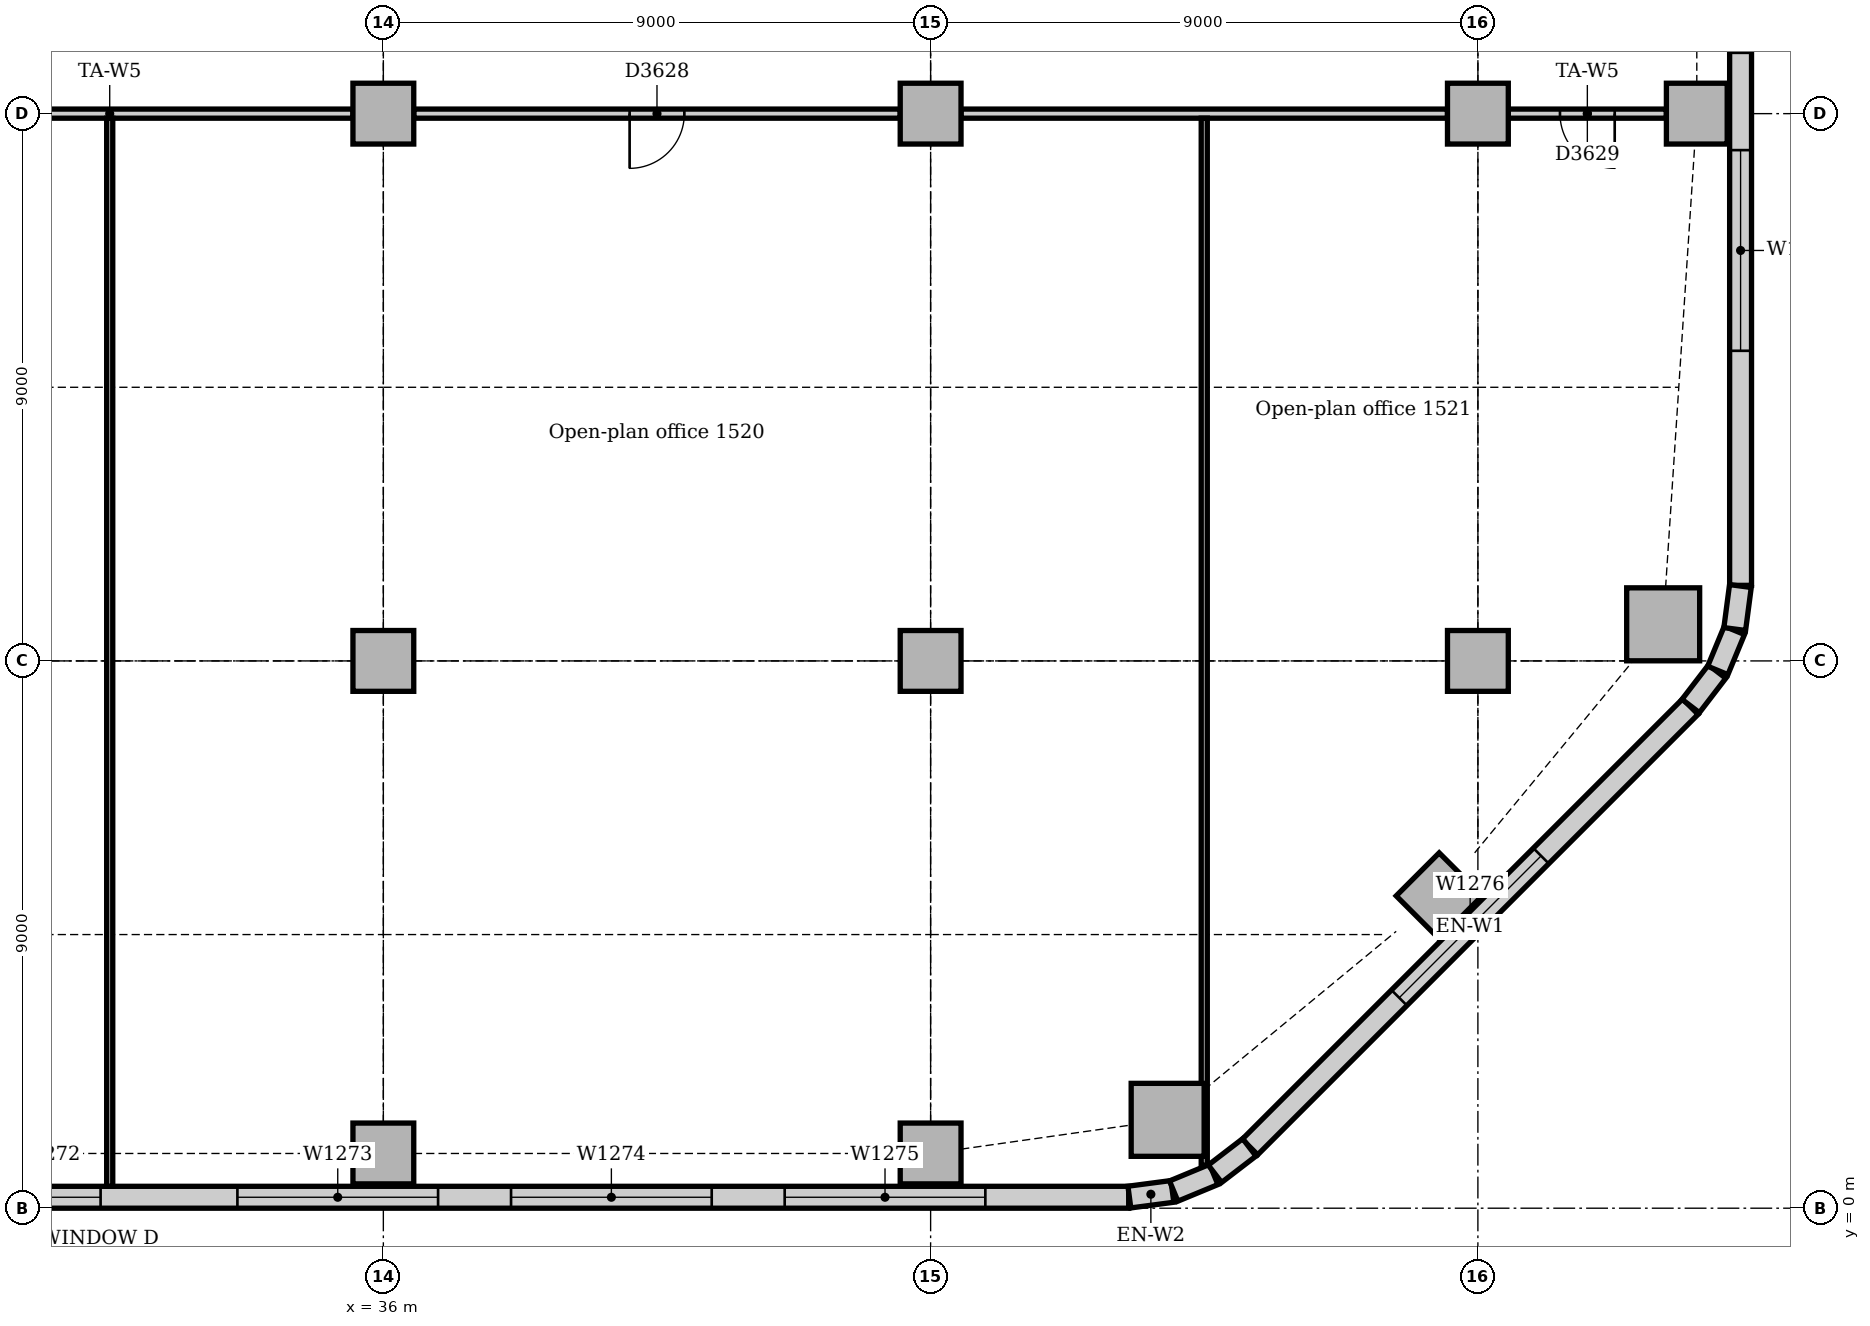
"""IFC4 building model, lengths in metres.
Left out: names, types, materials, properties, quantities, classifications, styles, units other than length and angle.
Written with IfcOpenShell. Run it as: python <this file> out.ifc"""

import sys

from ifc_helpers import new_model, si_unit, direction, frame, frame_2d, origin, origin_2d, place, context, subcontext, project, spatial, rectangle, extrude, element, fill, save


model = new_model("IFC4")
c1 = context("Model", 3, precision=1e-05, world=origin(), true_north=direction((0.0, 1.0)))
c2 = subcontext(c1, "Body", "Model", "MODEL_VIEW")
j1 = project(units=[si_unit("LENGTHUNIT", "METRE"), si_unit("PLANEANGLEUNIT", "RADIAN")], contexts=[c1])
p1 = place(None, origin())
s1 = spatial("IfcSite", under=j1, at=p1, CompositionType="ELEMENT")
p2 = place(p1, origin())
s2 = spatial("IfcBuilding", under=s1, at=p2, CompositionType="ELEMENT")
p3 = place(p2, frame((0.0, 0.0, 67.0)))
s3 = spatial("IfcBuildingStorey", under=s2, at=p3, CompositionType="ELEMENT", Elevation=67.0)
for number, where, z_axis, x_axis in (
    (1, (48.898, 1.453, 0.0), (0.0, 0.0, 1.0), (1.0, 0.0, 0.0)),
    (2, (57.047, 9.602, 0.0), (0.0, 0.0, 1.0), (1.0, 0.0, 0.0)),
):
    element("IfcColumn", number, at=place(p3, frame(where, z_axis=z_axis, x_axis=x_axis)), inside=s3, PredefinedType="COLUMN", context=c2, shape_type="SweptSolid", body=[
        extrude(rectangle(XDim=1.2, YDim=1.2, at=origin_2d()), origin(), (0.0, 0.0, 1.0), 3.85),
    ])
for number, where, z_axis, x_axis in (
    (3, (36.0, 0.9, 0.0), (0.0, 0.0, 1.0), (1.0, 0.0, 0.0)),
    (4, (45.0, 0.9, 0.0), (0.0, 0.0, 1.0), (1.0, 0.0, 0.0)),
    (5, (53.364, 5.136, 0.0), (0.0, 0.0, 1.0), (0.707, 0.707, 0.0)),
    (6, (57.6, 18.0, 0.0), (0.0, 0.0, 1.0), (1.0, 0.0, 0.0)),
    (7, (36.0, 9.0, 0.0), (0.0, 0.0, 1.0), (1.0, 0.0, 0.0)),
    (8, (36.0, 18.0, 0.0), (0.0, 0.0, 1.0), (1.0, 0.0, 0.0)),
    (9, (45.0, 9.0, 0.0), (0.0, 0.0, 1.0), (1.0, 0.0, 0.0)),
    (10, (45.0, 18.0, 0.0), (0.0, 0.0, 1.0), (1.0, 0.0, 0.0)),
    (11, (54.0, 9.0, 0.0), (0.0, 0.0, 1.0), (1.0, 0.0, 0.0)),
    (12, (54.0, 18.0, 0.0), (0.0, 0.0, 1.0), (1.0, 0.0, 0.0)),
):
    element("IfcColumn", number, at=place(p3, frame(where, z_axis=z_axis, x_axis=x_axis)), inside=s3, PredefinedType="COLUMN", context=c2, shape_type="SweptSolid", body=[
        extrude(rectangle(XDim=1.0, YDim=1.0, at=origin_2d()), origin(), (0.0, 0.0, 1.0), 3.85),
    ])
p4 = place(p3, frame((4.243, 0.18, 0.0), z_axis=(0.0, 0.0, 1.0), x_axis=(1.0, 0.0, 0.0)))
e13 = element("IfcWall", 13, at=p4, inside=s3, PredefinedType="STANDARD", context=c2, shape_type="SweptSolid", body=[
    extrude(rectangle(XDim=44.015, YDim=0.36, at=frame_2d((22.007, 0.0))), origin(), (0.0, 0.0, 1.0), 3.85),
])
p5 = place(p4, frame((2.357, 0.0, 0.9)))
e14 = element("IfcOpeningElement", 14, at=p5, cuts=e13, PredefinedType="OPENING", context=c2, shape_type="SweptSolid", body=[
    extrude(rectangle(XDim=3.3, YDim=1.6, at=frame_2d((1.65, 0.8))), frame((0.0, 0.19, 0.0), z_axis=(0.0, -1.0, 0.0), x_axis=(1.0, 0.0, 0.0)), (0.0, 0.0, 1.0), 0.38),
])
p6 = place(p4, frame((6.857, 0.0, 0.9)))
e15 = element("IfcOpeningElement", 15, at=p6, cuts=e13, PredefinedType="OPENING", context=c2, shape_type="SweptSolid", body=[
    extrude(rectangle(XDim=3.3, YDim=1.6, at=frame_2d((1.65, 0.8))), frame((0.0, 0.19, 0.0), z_axis=(0.0, -1.0, 0.0), x_axis=(1.0, 0.0, 0.0)), (0.0, 0.0, 1.0), 0.38),
])
p7 = place(p4, frame((11.357, 0.0, 0.9)))
e16 = element("IfcOpeningElement", 16, at=p7, cuts=e13, PredefinedType="OPENING", context=c2, shape_type="SweptSolid", body=[
    extrude(rectangle(XDim=3.3, YDim=1.6, at=frame_2d((1.65, 0.8))), frame((0.0, 0.19, 0.0), z_axis=(0.0, -1.0, 0.0), x_axis=(1.0, 0.0, 0.0)), (0.0, 0.0, 1.0), 0.38),
])
p8 = place(p4, frame((15.857, 0.0, 0.9)))
e17 = element("IfcOpeningElement", 17, at=p8, cuts=e13, PredefinedType="OPENING", context=c2, shape_type="SweptSolid", body=[
    extrude(rectangle(XDim=3.3, YDim=1.6, at=frame_2d((1.65, 0.8))), frame((0.0, 0.19, 0.0), z_axis=(0.0, -1.0, 0.0), x_axis=(1.0, 0.0, 0.0)), (0.0, 0.0, 1.0), 0.38),
])
p9 = place(p4, frame((20.357, 0.0, 0.9)))
e18 = element("IfcOpeningElement", 18, at=p9, cuts=e13, PredefinedType="OPENING", context=c2, shape_type="SweptSolid", body=[
    extrude(rectangle(XDim=3.3, YDim=1.6, at=frame_2d((1.65, 0.8))), frame((0.0, 0.19, 0.0), z_axis=(0.0, -1.0, 0.0), x_axis=(1.0, 0.0, 0.0)), (0.0, 0.0, 1.0), 0.38),
])
p10 = place(p4, frame((25.307, 0.0, 0.9)))
e19 = element("IfcOpeningElement", 19, at=p10, cuts=e13, PredefinedType="OPENING", context=c2, shape_type="SweptSolid", body=[
    extrude(rectangle(XDim=1.8, YDim=1.6, at=frame_2d((0.9, 0.8))), frame((0.0, 0.19, 0.0), z_axis=(0.0, -1.0, 0.0), x_axis=(1.0, 0.0, 0.0)), (0.0, 0.0, 1.0), 0.38),
])
p11 = place(p4, frame((29.357, 0.0, 0.9)))
e20 = element("IfcOpeningElement", 20, at=p11, cuts=e13, PredefinedType="OPENING", context=c2, shape_type="SweptSolid", body=[
    extrude(rectangle(XDim=3.3, YDim=1.6, at=frame_2d((1.65, 0.8))), frame((0.0, 0.19, 0.0), z_axis=(0.0, -1.0, 0.0), x_axis=(1.0, 0.0, 0.0)), (0.0, 0.0, 1.0), 0.38),
])
p12 = place(p4, frame((33.857, 0.0, 0.9)))
e21 = element("IfcOpeningElement", 21, at=p12, cuts=e13, PredefinedType="OPENING", context=c2, shape_type="SweptSolid", body=[
    extrude(rectangle(XDim=3.3, YDim=1.6, at=frame_2d((1.65, 0.8))), frame((0.0, 0.19, 0.0), z_axis=(0.0, -1.0, 0.0), x_axis=(1.0, 0.0, 0.0)), (0.0, 0.0, 1.0), 0.38),
])
p13 = place(p4, frame((38.357, 0.0, 0.9)))
e22 = element("IfcOpeningElement", 22, at=p13, cuts=e13, PredefinedType="OPENING", context=c2, shape_type="SweptSolid", body=[
    extrude(rectangle(XDim=3.3, YDim=1.6, at=frame_2d((1.65, 0.8))), frame((0.0, 0.19, 0.0), z_axis=(0.0, -1.0, 0.0), x_axis=(1.0, 0.0, 0.0)), (0.0, 0.0, 1.0), 0.38),
])
p14 = place(p3, frame((50.251, 1.006, 0.0), z_axis=(0.0, 0.0, 1.0), x_axis=(0.707106781187, 0.707106781187, 0.0)))
e23 = element("IfcWall", 23, at=p14, inside=s3, PredefinedType="STANDARD", context=c2, shape_type="SweptSolid", body=[
    extrude(rectangle(XDim=10.243, YDim=0.36, at=frame_2d((5.121, 0.0))), origin(), (0.0, 0.0, 1.0), 3.85),
])
p15 = place(p14, frame((3.471, 0.0, 0.9)))
e24 = element("IfcOpeningElement", 24, at=p15, cuts=e23, PredefinedType="OPENING", context=c2, shape_type="SweptSolid", body=[
    extrude(rectangle(XDim=3.3, YDim=1.6, at=frame_2d((1.65, 0.8))), frame((0.0, 0.19, 0.0), z_axis=(0.0, -1.0, 0.0), x_axis=(1.0, 0.0, 0.0)), (0.0, 0.0, 1.0), 0.38),
])
p16 = place(p3, frame((58.32, 10.243, 0.0), z_axis=(0.0, 0.0, 1.0), x_axis=(0.0, 1.0, 0.0)))
e25 = element("IfcWall", 25, at=p16, inside=s3, PredefinedType="STANDARD", context=c2, shape_type="SweptSolid", body=[
    extrude(rectangle(XDim=24.515, YDim=0.36, at=frame_2d((12.257, 0.0))), origin(), (0.0, 0.0, 1.0), 3.85),
])
p17 = place(p16, frame((3.857, 0.0, 0.9)))
e26 = element("IfcOpeningElement", 26, at=p17, cuts=e25, PredefinedType="OPENING", context=c2, shape_type="SweptSolid", body=[
    extrude(rectangle(XDim=3.3, YDim=1.6, at=frame_2d((1.65, 0.8))), frame((0.0, 0.19, 0.0), z_axis=(0.0, -1.0, 0.0), x_axis=(1.0, 0.0, 0.0)), (0.0, 0.0, 1.0), 0.38),
])
p18 = place(p16, frame((8.757, 0.0, 0.9)))
e27 = element("IfcOpeningElement", 27, at=p18, cuts=e25, PredefinedType="OPENING", context=c2, shape_type="SweptSolid", body=[
    extrude(rectangle(XDim=1.8, YDim=1.6, at=frame_2d((0.9, 0.8))), frame((0.0, 0.19, 0.0), z_axis=(0.0, -1.0, 0.0), x_axis=(1.0, 0.0, 0.0)), (0.0, 0.0, 1.0), 0.38),
])
p19 = place(p16, frame((12.857, 0.0, 0.9)))
e28 = element("IfcOpeningElement", 28, at=p19, cuts=e25, PredefinedType="OPENING", context=c2, shape_type="SweptSolid", body=[
    extrude(rectangle(XDim=3.3, YDim=1.6, at=frame_2d((1.65, 0.8))), frame((0.0, 0.19, 0.0), z_axis=(0.0, -1.0, 0.0), x_axis=(1.0, 0.0, 0.0)), (0.0, 0.0, 1.0), 0.38),
])
p20 = place(p16, frame((17.357, 0.0, 0.9)))
e29 = element("IfcOpeningElement", 29, at=p20, cuts=e25, PredefinedType="OPENING", context=c2, shape_type="SweptSolid", body=[
    extrude(rectangle(XDim=3.3, YDim=1.6, at=frame_2d((1.65, 0.8))), frame((0.0, 0.19, 0.0), z_axis=(0.0, -1.0, 0.0), x_axis=(1.0, 0.0, 0.0)), (0.0, 0.0, 1.0), 0.38),
])
for number, where, z_axis, x_axis in (
    (30, (48.269, 0.183, 0.0), (0.0, 0.0, 1.0), (0.991, 0.131, 0.0)),
    (31, (48.997, 0.282, 0.0), (0.0, 0.0, 1.0), (0.924, 0.383, 0.0)),
):
    element("IfcWall", number, at=place(p3, frame(where, z_axis=z_axis, x_axis=x_axis)), inside=s3, PredefinedType="STANDARD", context=c2, shape_type="SweptSolid", body=[
        extrude(rectangle(XDim=0.713, YDim=0.36, at=frame_2d((0.356, 0.0))), origin(), (0.0, 0.0, 1.0), 3.85),
    ])
for number, where, z_axis, x_axis in (
    (32, (49.675, 0.566, 0.0), (0.0, 0.0, 1.0), (0.793, 0.609, 0.0)),
    (33, (57.5, 8.259, 0.0), (0.0, 0.0, 1.0), (0.609, 0.793, 0.0)),
):
    element("IfcWall", number, at=place(p3, frame(where, z_axis=z_axis, x_axis=x_axis)), inside=s3, PredefinedType="STANDARD", context=c2, shape_type="SweptSolid", body=[
        extrude(rectangle(XDim=0.713, YDim=0.36, at=frame_2d((0.357, 0.0))), origin(), (0.0, 0.0, 1.0), 3.85),
    ])
for number, where, z_axis, x_axis in (
    (34, (57.945, 8.844, 0.0), (0.0, 0.0, 1.0), (0.383, 0.924, 0.0)),
    (35, (58.224, 9.524, 0.0), (0.0, 0.0, 1.0), (0.131, 0.991, 0.0)),
):
    element("IfcWall", number, at=place(p3, frame(where, z_axis=z_axis, x_axis=x_axis)), inside=s3, PredefinedType="STANDARD", context=c2, shape_type="SweptSolid", body=[
        extrude(rectangle(XDim=0.713, YDim=0.36, at=frame_2d((0.356, 0.0))), origin(), (0.0, 0.0, 1.0), 3.85),
    ])
p21 = place(p3, frame((54.5, 18.0, 0.0), z_axis=(0.0, 0.0, 1.0), x_axis=(1.0, 0.0, 0.0)))
e36 = element("IfcWall", 36, at=p21, inside=s3, PredefinedType="PARTITIONING", context=c2, shape_type="SweptSolid", body=[
    extrude(rectangle(XDim=2.6, YDim=0.15, at=frame_2d((1.3, 0.0))), origin(), (0.0, 0.0, 1.0), 3.602),
])
p22 = place(p21, frame((0.85, 0.0, 0.0)))
e37 = element("IfcOpeningElement", 37, at=p22, cuts=e36, PredefinedType="OPENING", context=c2, shape_type="SweptSolid", body=[
    extrude(rectangle(XDim=0.9, YDim=2.1, at=frame_2d((0.45, 1.05))), frame((0.0, 0.085, 0.0), z_axis=(0.0, -1.0, 0.0), x_axis=(1.0, 0.0, 0.0)), (0.0, 0.0, 1.0), 0.17),
])
p23 = place(p3, frame((45.5, 18.0, 0.0), z_axis=(0.0, 0.0, 1.0), x_axis=(1.0, 0.0, 0.0)))
e38 = element("IfcWall", 38, at=p23, inside=s3, PredefinedType="PARTITIONING", context=c2, shape_type="SweptSolid", body=[
    extrude(rectangle(XDim=8.0, YDim=0.15, at=frame_2d((4.0, 0.0))), origin(), (0.0, 0.0, 1.0), 3.15),
])
p24 = place(p3, frame((36.5, 18.0, 0.0), z_axis=(0.0, 0.0, 1.0), x_axis=(1.0, 0.0, 0.0)))
e39 = element("IfcWall", 39, at=p24, inside=s3, PredefinedType="PARTITIONING", context=c2, shape_type="SweptSolid", body=[
    extrude(rectangle(XDim=8.0, YDim=0.15, at=frame_2d((4.0, 0.0))), origin(), (0.0, 0.0, 1.0), 3.15),
])
p25 = place(p24, frame((3.55, 0.0, 0.0)))
e40 = element("IfcOpeningElement", 40, at=p25, cuts=e39, PredefinedType="OPENING", context=c2, shape_type="SweptSolid", body=[
    extrude(rectangle(XDim=0.9, YDim=2.1, at=frame_2d((0.45, 1.05))), frame((0.0, 0.085, 0.0), z_axis=(0.0, -1.0, 0.0), x_axis=(1.0, 0.0, 0.0)), (0.0, 0.0, 1.0), 0.17),
])
p26 = place(p3, frame((27.5, 18.0, 0.0), z_axis=(0.0, 0.0, 1.0), x_axis=(1.0, 0.0, 0.0)))
e41 = element("IfcWall", 41, at=p26, inside=s3, PredefinedType="PARTITIONING", context=c2, shape_type="SweptSolid", body=[
    extrude(rectangle(XDim=8.0, YDim=0.15, at=frame_2d((4.0, 0.0))), origin(), (0.0, 0.0, 1.0), 3.15),
])
p27 = place(p3, frame((31.5, 0.36, 0.0), z_axis=(0.0, 0.0, 1.0), x_axis=(0.0, 1.0, 0.0)))
e42 = element("IfcWall", 42, at=p27, inside=s3, PredefinedType="PARTITIONING", context=c2, shape_type="SweptSolid", body=[
    extrude(rectangle(XDim=17.565, YDim=0.1, at=frame_2d((8.783, 0.0))), origin(), (0.0, 0.0, 1.0), 3.85),
])
p28 = place(p3, frame((49.5, 0.706, 0.0), z_axis=(0.0, 0.0, 1.0), x_axis=(0.0, 1.0, 0.0)))
e43 = element("IfcWall", 43, at=p28, inside=s3, PredefinedType="PARTITIONING", context=c2, shape_type="SweptSolid", body=[
    extrude(rectangle(XDim=17.219, YDim=0.1, at=frame_2d((8.61, 0.0))), origin(), (0.0, 0.0, 1.0), 3.85),
])
p29 = place(p10, origin())
e44 = element("IfcWindow", 44, at=p29, inside=s3, PartitioningType="SINGLE_PANEL", PredefinedType="WINDOW", context=c2, shape_type="SweptSolid", body=[
    extrude(rectangle(XDim=1.8, YDim=1.6, at=frame_2d((0.9, 0.8))), frame((0.0, 0.13, 0.0), z_axis=(0.0, -1.0, 0.0), x_axis=(1.0, 0.0, 0.0)), (0.0, 0.0, 1.0), 0.06),
])
fill(e19, e44)
p30 = place(p11, origin())
e45 = element("IfcWindow", 45, at=p30, inside=s3, PartitioningType="SINGLE_PANEL", PredefinedType="WINDOW", context=c2, shape_type="SweptSolid", body=[
    extrude(rectangle(XDim=3.3, YDim=1.6, at=frame_2d((1.65, 0.8))), frame((0.0, 0.13, 0.0), z_axis=(0.0, -1.0, 0.0), x_axis=(1.0, 0.0, 0.0)), (0.0, 0.0, 1.0), 0.06),
])
fill(e20, e45)
p31 = place(p12, origin())
e46 = element("IfcWindow", 46, at=p31, inside=s3, PartitioningType="SINGLE_PANEL", PredefinedType="WINDOW", context=c2, shape_type="SweptSolid", body=[
    extrude(rectangle(XDim=3.3, YDim=1.6, at=frame_2d((1.65, 0.8))), frame((0.0, 0.13, 0.0), z_axis=(0.0, -1.0, 0.0), x_axis=(1.0, 0.0, 0.0)), (0.0, 0.0, 1.0), 0.06),
])
fill(e21, e46)
p32 = place(p13, origin())
e47 = element("IfcWindow", 47, at=p32, inside=s3, PartitioningType="SINGLE_PANEL", PredefinedType="WINDOW", context=c2, shape_type="SweptSolid", body=[
    extrude(rectangle(XDim=3.3, YDim=1.6, at=frame_2d((1.65, 0.8))), frame((0.0, 0.13, 0.0), z_axis=(0.0, -1.0, 0.0), x_axis=(1.0, 0.0, 0.0)), (0.0, 0.0, 1.0), 0.06),
])
fill(e22, e47)
p33 = place(p15, origin())
e48 = element("IfcWindow", 48, at=p33, inside=s3, PartitioningType="SINGLE_PANEL", PredefinedType="WINDOW", context=c2, shape_type="SweptSolid", body=[
    extrude(rectangle(XDim=3.3, YDim=1.6, at=frame_2d((1.65, 0.8))), frame((0.0, 0.13, 0.0), z_axis=(0.0, -1.0, 0.0), x_axis=(1.0, 0.0, 0.0)), (0.0, 0.0, 1.0), 0.06),
])
fill(e24, e48)
p34 = place(p17, origin())
e49 = element("IfcWindow", 49, at=p34, inside=s3, PartitioningType="SINGLE_PANEL", PredefinedType="WINDOW", context=c2, shape_type="SweptSolid", body=[
    extrude(rectangle(XDim=3.3, YDim=1.6, at=frame_2d((1.65, 0.8))), frame((0.0, 0.13, 0.0), z_axis=(0.0, -1.0, 0.0), x_axis=(1.0, 0.0, 0.0)), (0.0, 0.0, 1.0), 0.06),
])
fill(e26, e49)
p35 = place(p25, frame((0.9, 0.0, 0.0), z_axis=(0.0, 0.0, 1.0), x_axis=(-1.0, 0.0, 0.0)))
e50 = element("IfcDoor", 50, at=p35, inside=s3, OperationType="SINGLE_SWING_RIGHT", PredefinedType="DOOR", context=c2, shape_type="SweptSolid", body=[
    extrude(rectangle(XDim=0.9, YDim=2.1, at=frame_2d((0.45, 1.05))), frame((0.0, 0.025, 0.0), z_axis=(0.0, -1.0, 0.0), x_axis=(1.0, 0.0, 0.0)), (0.0, 0.0, 1.0), 0.05),
])
fill(e40, e50)
p36 = place(p22, frame((0.9, 0.0, 0.0), z_axis=(0.0, 0.0, 1.0), x_axis=(-1.0, 0.0, 0.0)))
e51 = element("IfcDoor", 51, at=p36, inside=s3, OperationType="SINGLE_SWING_LEFT", PredefinedType="DOOR", context=c2, shape_type="SweptSolid", body=[
    extrude(rectangle(XDim=0.9, YDim=2.1, at=frame_2d((0.45, 1.05))), frame((0.0, 0.025, 0.0), z_axis=(0.0, -1.0, 0.0), x_axis=(1.0, 0.0, 0.0)), (0.0, 0.0, 1.0), 0.05),
])
fill(e37, e51)
save(model, sys.argv[1])
